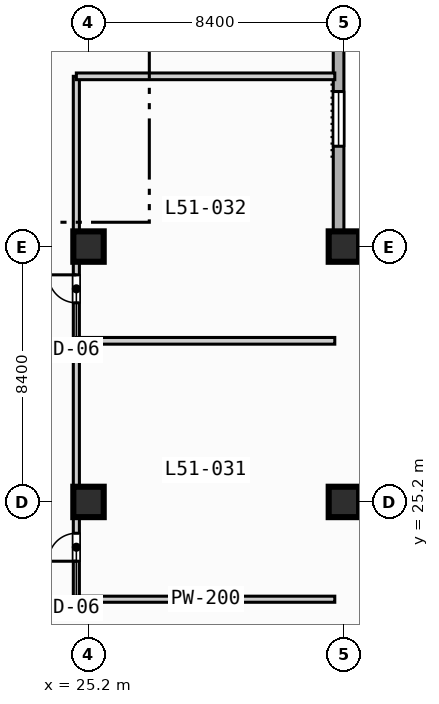
"""IFC4 building model, lengths in metres.
Left out: names, types, materials, properties, quantities, classifications, styles, units other than length and angle.
Written with IfcOpenShell. Run it as: python <this file> out.ifc"""

import sys

from ifc_helpers import new_model, si_unit, direction, frame, frame_2d, origin, origin_2d, place, context, subcontext, project, spatial, rectangle, extrude, element, fill, save


model = new_model("IFC4")
c1 = context("Model", 3, precision=1e-05, world=origin(), true_north=direction((0.0, 1.0)))
c2 = subcontext(c1, "Body", "Model", "MODEL_VIEW")
j1 = project(units=[si_unit("LENGTHUNIT", "METRE"), si_unit("PLANEANGLEUNIT", "RADIAN")], contexts=[c1])
p1 = place(None, origin())
s1 = spatial("IfcSite", under=j1, at=p1, CompositionType="ELEMENT")
p2 = place(p1, origin())
s2 = spatial("IfcBuilding", under=s1, at=p2, CompositionType="ELEMENT")
p3 = place(p2, frame((0.0, 0.0, 208.7)))
s3 = spatial("IfcBuildingStorey", under=s2, at=p3, CompositionType="ELEMENT", Elevation=208.7)
for number, where, z_axis, x_axis in (
    (1, (25.2, 25.2, 0.0), (0.0, 0.0, 1.0), (1.0, 0.0, 0.0)),
    (2, (25.2, 33.6, 0.0), (0.0, 0.0, 1.0), (1.0, 0.0, 0.0)),
    (3, (33.6, 25.2, 0.0), (0.0, 0.0, 1.0), (1.0, 0.0, 0.0)),
    (4, (33.6, 33.6, 0.0), (0.0, 0.0, 1.0), (1.0, 0.0, 0.0)),
):
    element("IfcColumn", number, at=place(p3, frame(where, z_axis=z_axis, x_axis=x_axis)), inside=s3, PredefinedType="COLUMN", context=c2, shape_type="SweptSolid", body=[
        extrude(rectangle(XDim=1.0, YDim=1.0, at=origin_2d()), origin(), (0.0, 0.0, 1.0), 3.7),
    ])
p4 = place(p3, frame((33.425, 72.425, 0.0), z_axis=(0.0, 0.0, 1.0), x_axis=(0.0, -1.0, 0.0)))
e5 = element("IfcWall", 5, at=p4, inside=s3, PredefinedType="STANDARD", context=c2, shape_type="SweptSolid", body=[
    extrude(rectangle(XDim=39.0, YDim=0.35, at=frame_2d((19.5, 0.0))), origin(), (0.0, 0.0, 1.0), 3.47),
])
p5 = place(p4, frame((33.725, 0.0, 0.85)))
e6 = element("IfcOpeningElement", 6, at=p5, cuts=e5, PredefinedType="OPENING", context=c2, shape_type="SweptSolid", body=[
    extrude(rectangle(XDim=1.8, YDim=1.8, at=frame_2d((0.9, 0.9))), frame((0.0, 0.185, 0.0), z_axis=(0.0, -1.0, 0.0), x_axis=(1.0, 0.0, 0.0)), (0.0, 0.0, 1.0), 0.37),
])
p6 = place(p4, frame((16.925, 0.0, 0.85)))
e7 = element("IfcOpeningElement", 7, at=p6, cuts=e5, PredefinedType="OPENING", context=c2, shape_type="SweptSolid", body=[
    extrude(rectangle(XDim=1.8, YDim=1.8, at=frame_2d((0.9, 0.9))), frame((0.0, 0.185, 0.0), z_axis=(0.0, -1.0, 0.0), x_axis=(1.0, 0.0, 0.0)), (0.0, 0.0, 1.0), 0.37),
])
p7 = place(p4, frame((8.225, 0.0, 0.85)))
e8 = element("IfcOpeningElement", 8, at=p7, cuts=e5, PredefinedType="OPENING", context=c2, shape_type="SweptSolid", body=[
    extrude(rectangle(XDim=2.4, YDim=1.95, at=frame_2d((1.2, 0.975))), frame((0.0, 0.185, 0.0), z_axis=(0.0, -1.0, 0.0), x_axis=(1.0, 0.0, 0.0)), (0.0, 0.0, 1.0), 0.37),
])
p8 = place(p3, frame((33.425, 33.425, 0.0), z_axis=(0.0, 0.0, 1.0), x_axis=(1.0, 0.0, 0.0)))
e9 = element("IfcWall", 9, at=p8, inside=s3, PredefinedType="STANDARD", context=c2, shape_type="SweptSolid", body=[
    extrude(rectangle(XDim=39.0, YDim=0.35, at=frame_2d((19.5, 0.0))), origin(), (0.0, 0.0, 1.0), 3.47),
])
p9 = place(p8, frame((12.075, 0.0, 0.0)))
e10 = element("IfcOpeningElement", 10, at=p9, cuts=e9, PredefinedType="OPENING", context=c2, shape_type="SweptSolid", body=[
    extrude(rectangle(XDim=1.4, YDim=2.2, at=frame_2d((0.7, 1.1))), frame((0.0, 0.185, 0.0), z_axis=(0.0, -1.0, 0.0), x_axis=(1.0, 0.0, 0.0)), (0.0, 0.0, 1.0), 0.37),
])
p10 = place(p3, frame((24.8, 22.0, 0.0), z_axis=(0.0, 0.0, 1.0), x_axis=(0.0, 1.0, 0.0)))
e11 = element("IfcWall", 11, at=p10, inside=s3, PredefinedType="PARTITIONING", context=c2, shape_type="SweptSolid", body=[
    extrude(rectangle(XDim=17.2, YDim=0.2, at=frame_2d((8.6, 0.0))), origin(), (0.0, 0.0, 1.0), 3.47),
])
p11 = place(p10, frame((1.25, 0.0, 0.0)))
e12 = element("IfcOpeningElement", 12, at=p11, cuts=e11, PredefinedType="OPENING", context=c2, shape_type="SweptSolid", body=[
    extrude(rectangle(XDim=0.92, YDim=2.1, at=frame_2d((0.46, 1.05))), frame((0.0, 0.11, 0.0), z_axis=(0.0, -1.0, 0.0), x_axis=(1.0, 0.0, 0.0)), (0.0, 0.0, 1.0), 0.22),
])
p12 = place(p10, frame((9.75, 0.0, 0.0)))
e13 = element("IfcOpeningElement", 13, at=p12, cuts=e11, PredefinedType="OPENING", context=c2, shape_type="SweptSolid", body=[
    extrude(rectangle(XDim=0.92, YDim=2.1, at=frame_2d((0.46, 1.05))), frame((0.0, 0.11, 0.0), z_axis=(0.0, -1.0, 0.0), x_axis=(1.0, 0.0, 0.0)), (0.0, 0.0, 1.0), 0.22),
])
p13 = place(p3, frame((24.8, 22.0, 0.0), z_axis=(0.0, 0.0, 1.0), x_axis=(1.0, 0.0, 0.0)))
e14 = element("IfcWall", 14, at=p13, inside=s3, PredefinedType="PARTITIONING", context=c2, shape_type="SweptSolid", body=[
    extrude(rectangle(XDim=8.5, YDim=0.2, at=frame_2d((4.25, 0.0))), origin(), (0.0, 0.0, 1.0), 3.47),
])
for number, where, z_axis, x_axis in (
    (15, (24.8, 30.5, 0.0), (0.0, 0.0, 1.0), (1.0, 0.0, 0.0)),
    (16, (24.8, 39.2, 0.0), (0.0, 0.0, 1.0), (1.0, 0.0, 0.0)),
):
    element("IfcWall", number, at=place(p3, frame(where, z_axis=z_axis, x_axis=x_axis)), inside=s3, PredefinedType="PARTITIONING", context=c2, shape_type="SweptSolid", body=[
        extrude(rectangle(XDim=8.5, YDim=0.22, at=frame_2d((4.25, 0.0))), origin(), (0.0, 0.0, 1.0), 3.47),
    ])
p14 = place(p5, origin())
e17 = element("IfcWindow", 17, at=p14, inside=s3, PartitioningType="SINGLE_PANEL", PredefinedType="WINDOW", context=c2, shape_type="SweptSolid", body=[
    extrude(rectangle(XDim=1.8, YDim=1.8, at=frame_2d((0.9, 0.9))), frame((0.0, 0.03, 0.0), z_axis=(0.0, -1.0, 0.0), x_axis=(1.0, 0.0, 0.0)), (0.0, 0.0, 1.0), 0.06),
])
fill(e6, e17)
p15 = place(p11, origin())
e18 = element("IfcDoor", 18, at=p15, inside=s3, OperationType="SINGLE_SWING_LEFT", PredefinedType="DOOR", context=c2, shape_type="SweptSolid", body=[
    extrude(rectangle(XDim=0.92, YDim=2.1, at=frame_2d((0.46, 1.05))), frame((0.0, 0.025, 0.0), z_axis=(0.0, -1.0, 0.0), x_axis=(1.0, 0.0, 0.0)), (0.0, 0.0, 1.0), 0.05),
])
fill(e12, e18)
p16 = place(p12, origin())
e19 = element("IfcDoor", 19, at=p16, inside=s3, OperationType="SINGLE_SWING_RIGHT", PredefinedType="DOOR", context=c2, shape_type="SweptSolid", body=[
    extrude(rectangle(XDim=0.92, YDim=2.1, at=frame_2d((0.46, 1.05))), frame((0.0, 0.025, 0.0), z_axis=(0.0, -1.0, 0.0), x_axis=(1.0, 0.0, 0.0)), (0.0, 0.0, 1.0), 0.05),
])
fill(e13, e19)
save(model, sys.argv[1])
